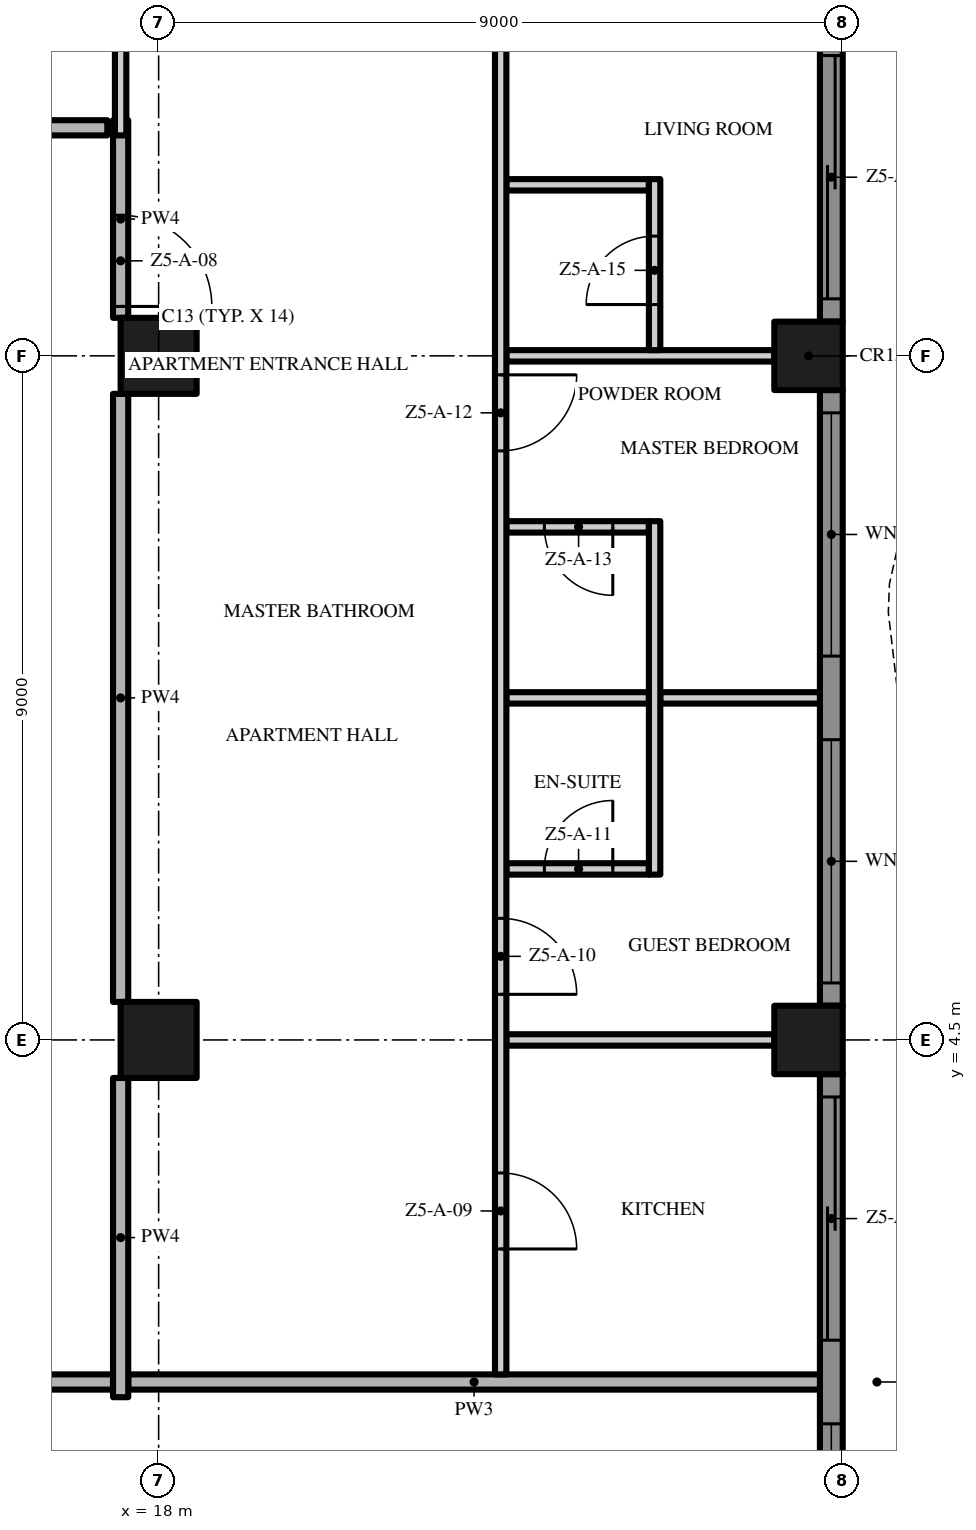
"""IFC4 building model, lengths in metres.
Left out: names, types, materials, properties, quantities, classifications, styles, units other than length and angle.
Written with IfcOpenShell. Run it as: python <this file> out.ifc"""

import sys

from ifc_helpers import new_model, si_unit, direction, frame, frame_2d, origin, origin_2d, place, context, subcontext, project, spatial, polyline, rectangle, outline, extrude, element, fill, save


model = new_model("IFC4")
c1 = context("Model", 3, precision=1e-05, world=origin(), true_north=direction((0.0, 1.0)))
c2 = subcontext(c1, "Body", "Model", "MODEL_VIEW")
j1 = project(units=[si_unit("LENGTHUNIT", "METRE"), si_unit("PLANEANGLEUNIT", "RADIAN")], contexts=[c1])
p1 = place(None, origin())
s1 = spatial("IfcSite", under=j1, at=p1, CompositionType="ELEMENT")
p2 = place(p1, origin())
s2 = spatial("IfcBuilding", under=s1, at=p2, CompositionType="ELEMENT")
p3 = place(p2, frame((0.0, 0.0, 238.8)))
s3 = spatial("IfcBuildingStorey", under=s2, at=p3, CompositionType="ELEMENT", Elevation=238.8)
for number, where, z_axis, x_axis in (
    (1, (18.0, 13.5, 0.0), (0.0, 0.0, 1.0), (1.0, 0.0, 0.0)),
    (2, (18.0, 4.5, 0.0), (0.0, 0.0, 1.0), (1.0, 0.0, 0.0)),
):
    element("IfcColumn", number, at=place(p3, frame(where, z_axis=z_axis, x_axis=x_axis)), inside=s3, PredefinedType="COLUMN", context=c2, shape_type="SweptSolid", body=[
        extrude(rectangle(XDim=1.0, YDim=1.0, at=origin_2d()), origin(), (0.0, 0.0, 1.0), 3.5),
    ])
for number, where, z_axis, x_axis in (
    (3, (26.55, 13.5, 0.0), (0.0, 0.0, 1.0), (1.0, 0.0, 0.0)),
    (4, (26.55, 4.5, 0.0), (0.0, 0.0, 1.0), (1.0, 0.0, 0.0)),
):
    element("IfcColumn", number, at=place(p3, frame(where, z_axis=z_axis, x_axis=x_axis)), inside=s3, PredefinedType="COLUMN", context=c2, shape_type="SweptSolid", body=[
        extrude(rectangle(XDim=0.9, YDim=0.9, at=origin_2d()), origin(), (0.0, 0.0, 1.0), 3.5),
    ])
p4 = place(p3, frame((26.85, 4.05, 0.0), z_axis=(0.0, 0.0, 1.0), x_axis=(0.0, -1.0, 0.0)))
e5 = element("IfcWall", 5, at=p4, inside=s3, PredefinedType="SOLIDWALL", context=c2, shape_type="SweptSolid", body=[
    extrude(rectangle(XDim=8.1, YDim=0.3, at=frame_2d((4.05, 0.0))), origin(), (0.0, 0.0, 1.0), 3.5),
])
p5 = place(p4, frame((4.6, 0.0, 0.45)))
e6 = element("IfcOpeningElement", 6, at=p5, cuts=e5, PredefinedType="OPENING", context=c2, shape_type="SweptSolid", body=[
    extrude(rectangle(XDim=3.2, YDim=2.65, at=frame_2d((1.6, 1.325))), frame((0.0, 0.16, 0.0), z_axis=(0.0, -1.0, 0.0), x_axis=(1.0, 0.0, 0.0)), (0.0, 0.0, 1.0), 0.32),
])
p6 = place(p4, frame((0.3, 0.0, 0.0)))
e7 = element("IfcOpeningElement", 7, at=p6, cuts=e5, PredefinedType="OPENING", context=c2, shape_type="SweptSolid", body=[
    extrude(rectangle(XDim=3.2, YDim=2.4, at=frame_2d((1.6, 1.2))), frame((0.0, 0.16, 0.0), z_axis=(0.0, -1.0, 0.0), x_axis=(1.0, 0.0, 0.0)), (0.0, 0.0, 1.0), 0.32),
])
p7 = place(p3, frame((26.85, 13.05, 0.0), z_axis=(0.0, 0.0, 1.0), x_axis=(0.0, -1.0, 0.0)))
e8 = element("IfcWall", 8, at=p7, inside=s3, PredefinedType="SOLIDWALL", context=c2, shape_type="SweptSolid", body=[
    extrude(rectangle(XDim=8.1, YDim=0.3, at=frame_2d((4.05, 0.0))), origin(), (0.0, 0.0, 1.0), 3.5),
])
p8 = place(p7, frame((4.6, 0.0, 0.45)))
e9 = element("IfcOpeningElement", 9, at=p8, cuts=e8, PredefinedType="OPENING", context=c2, shape_type="SweptSolid", body=[
    extrude(rectangle(XDim=3.2, YDim=2.65, at=frame_2d((1.6, 1.325))), frame((0.0, 0.16, 0.0), z_axis=(0.0, -1.0, 0.0), x_axis=(1.0, 0.0, 0.0)), (0.0, 0.0, 1.0), 0.32),
])
p9 = place(p7, frame((0.3, 0.0, 0.45)))
e10 = element("IfcOpeningElement", 10, at=p9, cuts=e8, PredefinedType="OPENING", context=c2, shape_type="SweptSolid", body=[
    extrude(rectangle(XDim=3.2, YDim=2.65, at=frame_2d((1.6, 1.325))), frame((0.0, 0.16, 0.0), z_axis=(0.0, -1.0, 0.0), x_axis=(1.0, 0.0, 0.0)), (0.0, 0.0, 1.0), 0.32),
])
p10 = place(p3, frame((26.85, 18.0, 0.0), z_axis=(0.0, 0.0, 1.0), x_axis=(0.0, -1.0, 0.0)))
e11 = element("IfcWall", 11, at=p10, inside=s3, PredefinedType="SOLIDWALL", context=c2, shape_type="SweptSolid", body=[
    extrude(rectangle(XDim=4.05, YDim=0.3, at=frame_2d((2.025, 0.0))), origin(), (0.0, 0.0, 1.0), 3.5),
])
p11 = place(p10, frame((0.55, 0.0, 0.0)))
e12 = element("IfcOpeningElement", 12, at=p11, cuts=e11, PredefinedType="OPENING", context=c2, shape_type="SweptSolid", body=[
    extrude(rectangle(XDim=3.2, YDim=2.4, at=frame_2d((1.6, 1.2))), frame((0.0, 0.16, 0.0), z_axis=(0.0, -1.0, 0.0), x_axis=(1.0, 0.0, 0.0)), (0.0, 0.0, 1.0), 0.32),
])
p12 = place(p3, origin())
e13 = element("IfcWall", 13, at=p12, inside=s3, PredefinedType="USERDEFINED", context=c2, shape_type="SweptSolid", body=[
    extrude(outline(polyline([(27.951, -18.0), (28.612, -16.5), (29.345, -15.0), (29.869, -13.5), (30.0, -12.375), (29.985, -12.0), (29.649, -10.5), (28.988, -9.0), (28.255, -7.5), (27.731, -6.0), (27.6, -4.875), (27.615, -4.5), (27.951, -3.0), (28.612, -1.5), (29.345, 0.0), (29.869, 1.5), (30.0, 2.625), (29.985, 3.0), (29.649, 4.5), (28.988, 6.0), (28.255, 7.5), (27.731, 9.0), (27.6, 10.125), (27.615, 10.5), (27.951, 12.0), (28.612, 13.5), (29.345, 15.0), (29.869, 16.5), (30.0, 17.625), (29.985, 18.0), (29.735, 17.99), (29.749, 17.635), (29.624, 16.556), (29.114, 15.096), (28.385, 13.605), (27.713, 12.079), (27.366, 10.533), (27.349, 10.115), (27.486, 8.944), (28.024, 7.404), (28.761, 5.895), (29.41, 4.421), (29.736, 2.967), (29.749, 2.635), (29.624, 1.556), (29.114, 0.096), (28.385, -1.395), (27.713, -2.921), (27.366, -4.467), (27.349, -4.885), (27.486, -6.056), (28.024, -7.596), (28.761, -9.105), (29.41, -10.579), (29.736, -12.033), (29.749, -12.365), (29.624, -13.444), (29.114, -14.904), (28.385, -16.395), (27.723, -17.899), (27.951, -18.0)])), origin(), (0.0, 0.0, 1.0), 0.9),
])
p13 = place(p3, frame((17.4, 0.0, 0.0), z_axis=(0.0, 0.0, 1.0), x_axis=(-1.0, 0.0, 0.0)))
e14 = element("IfcWall", 14, at=p13, inside=s3, PredefinedType="PARTITIONING", context=c2, shape_type="SweptSolid", body=[
    extrude(rectangle(XDim=34.8, YDim=0.2, at=frame_2d((17.4, 0.0))), origin(), (0.0, 0.0, 1.0), 3.5),
])
p14 = place(p13, frame((25.65, 0.0, 0.0)))
e15 = element("IfcOpeningElement", 15, at=p14, cuts=e14, PredefinedType="OPENING", context=c2, shape_type="SweptSolid", body=[
    extrude(rectangle(XDim=1.5, YDim=2.4, at=frame_2d((0.75, 1.2))), frame((0.0, 0.11, 0.0), z_axis=(0.0, -1.0, 0.0), x_axis=(1.0, 0.0, 0.0)), (0.0, 0.0, 1.0), 0.22),
])
p15 = place(p13, frame((7.65, 0.0, 0.0)))
e16 = element("IfcOpeningElement", 16, at=p15, cuts=e14, PredefinedType="OPENING", context=c2, shape_type="SweptSolid", body=[
    extrude(rectangle(XDim=1.5, YDim=2.4, at=frame_2d((0.75, 1.2))), frame((0.0, 0.11, 0.0), z_axis=(0.0, -1.0, 0.0), x_axis=(1.0, 0.0, 0.0)), (0.0, 0.0, 1.0), 0.22),
])
p16 = place(p3, frame((17.6, 0.0, 0.0), z_axis=(0.0, 0.0, 1.0), x_axis=(1.0, 0.0, 0.0)))
e17 = element("IfcWall", 17, at=p16, inside=s3, PredefinedType="PARTITIONING", context=c2, shape_type="SweptSolid", body=[
    extrude(rectangle(XDim=9.1, YDim=0.2, at=frame_2d((4.55, 0.0))), origin(), (0.0, 0.0, 1.0), 3.5),
])
p17 = place(p3, frame((22.575, 4.5, 0.0), z_axis=(0.0, 0.0, 1.0), x_axis=(1.0, 0.0, 0.0)))
e18 = element("IfcWall", 18, at=p17, inside=s3, PredefinedType="PARTITIONING", context=c2, shape_type="SweptSolid", body=[
    extrude(rectangle(XDim=3.525, YDim=0.15, at=frame_2d((1.762, 0.0))), origin(), (0.0, 0.0, 1.0), 3.5),
])
p18 = place(p3, frame((22.575, 6.75, 0.0), z_axis=(0.0, 0.0, 1.0), x_axis=(1.0, 0.0, 0.0)))
e19 = element("IfcWall", 19, at=p18, inside=s3, PredefinedType="PARTITIONING", context=c2, shape_type="SweptSolid", body=[
    extrude(rectangle(XDim=1.875, YDim=0.15, at=frame_2d((0.938, 0.0))), origin(), (0.0, 0.0, 1.0), 3.5),
])
p19 = place(p18, frame((0.5, 0.0, 0.0)))
e20 = element("IfcOpeningElement", 20, at=p19, cuts=e19, PredefinedType="OPENING", context=c2, shape_type="SweptSolid", body=[
    extrude(rectangle(XDim=0.9, YDim=2.1, at=frame_2d((0.45, 1.05))), frame((0.0, 0.085, 0.0), z_axis=(0.0, -1.0, 0.0), x_axis=(1.0, 0.0, 0.0)), (0.0, 0.0, 1.0), 0.17),
])
p20 = place(p3, frame((22.575, 9.0, 0.0), z_axis=(0.0, 0.0, 1.0), x_axis=(1.0, 0.0, 0.0)))
e21 = element("IfcWall", 21, at=p20, inside=s3, PredefinedType="PARTITIONING", context=c2, shape_type="SweptSolid", body=[
    extrude(rectangle(XDim=1.875, YDim=0.15, at=frame_2d((0.938, 0.0))), origin(), (0.0, 0.0, 1.0), 3.5),
])
p21 = place(p3, frame((24.6, 9.0, 0.0), z_axis=(0.0, 0.0, 1.0), x_axis=(1.0, 0.0, 0.0)))
e22 = element("IfcWall", 22, at=p21, inside=s3, PredefinedType="PARTITIONING", context=c2, shape_type="SweptSolid", body=[
    extrude(rectangle(XDim=2.1, YDim=0.15, at=frame_2d((1.05, 0.0))), origin(), (0.0, 0.0, 1.0), 3.5),
])
p22 = place(p3, frame((24.45, 11.25, 0.0), z_axis=(0.0, 0.0, 1.0), x_axis=(-1.0, 0.0, 0.0)))
e23 = element("IfcWall", 23, at=p22, inside=s3, PredefinedType="PARTITIONING", context=c2, shape_type="SweptSolid", body=[
    extrude(rectangle(XDim=1.875, YDim=0.15, at=frame_2d((0.938, 0.0))), origin(), (0.0, 0.0, 1.0), 3.5),
])
p23 = place(p22, frame((0.475, 0.0, 0.0)))
e24 = element("IfcOpeningElement", 24, at=p23, cuts=e23, PredefinedType="OPENING", context=c2, shape_type="SweptSolid", body=[
    extrude(rectangle(XDim=0.9, YDim=2.1, at=frame_2d((0.45, 1.05))), frame((0.0, 0.085, 0.0), z_axis=(0.0, -1.0, 0.0), x_axis=(1.0, 0.0, 0.0)), (0.0, 0.0, 1.0), 0.17),
])
p24 = place(p3, frame((22.575, 13.5, 0.0), z_axis=(0.0, 0.0, 1.0), x_axis=(1.0, 0.0, 0.0)))
e25 = element("IfcWall", 25, at=p24, inside=s3, PredefinedType="PARTITIONING", context=c2, shape_type="SweptSolid", body=[
    extrude(rectangle(XDim=3.525, YDim=0.15, at=frame_2d((1.762, 0.0))), origin(), (0.0, 0.0, 1.0), 3.5),
])
p25 = place(p3, frame((22.575, 15.75, 0.0), z_axis=(0.0, 0.0, 1.0), x_axis=(1.0, 0.0, 0.0)))
e26 = element("IfcWall", 26, at=p25, inside=s3, PredefinedType="PARTITIONING", context=c2, shape_type="SweptSolid", body=[
    extrude(rectangle(XDim=1.875, YDim=0.15, at=frame_2d((0.938, 0.0))), origin(), (0.0, 0.0, 1.0), 3.5),
])
p26 = place(p3, frame((13.5, 16.5, 0.0), z_axis=(0.0, 0.0, 1.0), x_axis=(1.0, 0.0, 0.0)))
e27 = element("IfcWall", 27, at=p26, inside=s3, PredefinedType="PARTITIONING", context=c2, shape_type="SweptSolid", body=[
    extrude(rectangle(XDim=3.825, YDim=0.2, at=frame_2d((1.913, 0.0))), origin(), (0.0, 0.0, 1.0), 3.5),
])
p27 = place(p26, frame((1.55, 0.0, 0.0)))
e28 = element("IfcOpeningElement", 28, at=p27, cuts=e27, PredefinedType="OPENING", context=c2, shape_type="SweptSolid", body=[
    extrude(rectangle(XDim=0.9, YDim=2.1, at=frame_2d((0.45, 1.05))), frame((0.0, 0.11, 0.0), z_axis=(0.0, -1.0, 0.0), x_axis=(1.0, 0.0, 0.0)), (0.0, 0.0, 1.0), 0.22),
])
p28 = place(p3, frame((17.5, -0.2, 0.0), z_axis=(0.0, 0.0, 1.0), x_axis=(0.0, 1.0, 0.0)))
e29 = element("IfcWall", 29, at=p28, inside=s3, PredefinedType="PARTITIONING", context=c2, shape_type="SweptSolid", body=[
    extrude(rectangle(XDim=4.2, YDim=0.2, at=frame_2d((2.1, 0.0))), origin(), (0.0, 0.0, 1.0), 3.5),
])
p29 = place(p3, frame((17.5, 5.0, 0.0), z_axis=(0.0, 0.0, 1.0), x_axis=(0.0, 1.0, 0.0)))
e30 = element("IfcWall", 30, at=p29, inside=s3, PredefinedType="PARTITIONING", context=c2, shape_type="SweptSolid", body=[
    extrude(rectangle(XDim=8.0, YDim=0.2, at=frame_2d((4.0, 0.0))), origin(), (0.0, 0.0, 1.0), 3.5),
])
p30 = place(p3, frame((17.5, 16.6, 0.0), z_axis=(0.0, 0.0, 1.0), x_axis=(0.0, -1.0, 0.0)))
e31 = element("IfcWall", 31, at=p30, inside=s3, PredefinedType="PARTITIONING", context=c2, shape_type="SweptSolid", body=[
    extrude(rectangle(XDim=2.6, YDim=0.2, at=frame_2d((1.3, 0.0))), origin(), (0.0, 0.0, 1.0), 3.5),
])
p31 = place(p30, frame((1.25, 0.0, 0.0)))
e32 = element("IfcOpeningElement", 32, at=p31, cuts=e31, PredefinedType="OPENING", context=c2, shape_type="SweptSolid", body=[
    extrude(rectangle(XDim=1.2, YDim=2.4, at=frame_2d((0.6, 1.2))), frame((0.0, 0.11, 0.0), z_axis=(0.0, -1.0, 0.0), x_axis=(1.0, 0.0, 0.0)), (0.0, 0.0, 1.0), 0.22),
])
p32 = place(p3, frame((17.5, 16.4, 0.0), z_axis=(0.0, 0.0, 1.0), x_axis=(0.0, 1.0, 0.0)))
e33 = element("IfcWall", 33, at=p32, inside=s3, PredefinedType="PARTITIONING", context=c2, shape_type="SweptSolid", body=[
    extrude(rectangle(XDim=5.2, YDim=0.15, at=frame_2d((2.6, 0.0))), origin(), (0.0, 0.0, 1.0), 3.5),
])
p33 = place(p3, frame((22.5, 17.55, 0.0), z_axis=(0.0, 0.0, 1.0), x_axis=(0.0, -1.0, 0.0)))
e34 = element("IfcWall", 34, at=p33, inside=s3, PredefinedType="PARTITIONING", context=c2, shape_type="SweptSolid", body=[
    extrude(rectangle(XDim=17.45, YDim=0.15, at=frame_2d((8.725, 0.0))), origin(), (0.0, 0.0, 1.0), 3.5),
])
p34 = place(p33, frame((14.8, 0.0, 0.0)))
e35 = element("IfcOpeningElement", 35, at=p34, cuts=e34, PredefinedType="OPENING", context=c2, shape_type="SweptSolid", body=[
    extrude(rectangle(XDim=1.0, YDim=2.4, at=frame_2d((0.5, 1.2))), frame((0.0, 0.085, 0.0), z_axis=(0.0, -1.0, 0.0), x_axis=(1.0, 0.0, 0.0)), (0.0, 0.0, 1.0), 0.17),
])
p35 = place(p33, frame((11.45, 0.0, 0.0)))
e36 = element("IfcOpeningElement", 36, at=p35, cuts=e34, PredefinedType="OPENING", context=c2, shape_type="SweptSolid", body=[
    extrude(rectangle(XDim=1.0, YDim=2.4, at=frame_2d((0.5, 1.2))), frame((0.0, 0.085, 0.0), z_axis=(0.0, -1.0, 0.0), x_axis=(1.0, 0.0, 0.0)), (0.0, 0.0, 1.0), 0.17),
])
p36 = place(p33, frame((4.3, 0.0, 0.0)))
e37 = element("IfcOpeningElement", 37, at=p36, cuts=e34, PredefinedType="OPENING", context=c2, shape_type="SweptSolid", body=[
    extrude(rectangle(XDim=1.0, YDim=2.4, at=frame_2d((0.5, 1.2))), frame((0.0, 0.085, 0.0), z_axis=(0.0, -1.0, 0.0), x_axis=(1.0, 0.0, 0.0)), (0.0, 0.0, 1.0), 0.17),
])
p37 = place(p3, frame((24.525, 6.675, 0.0), z_axis=(0.0, 0.0, 1.0), x_axis=(0.0, 1.0, 0.0)))
e38 = element("IfcWall", 38, at=p37, inside=s3, PredefinedType="PARTITIONING", context=c2, shape_type="SweptSolid", body=[
    extrude(rectangle(XDim=4.65, YDim=0.15, at=frame_2d((2.325, 0.0))), origin(), (0.0, 0.0, 1.0), 3.5),
])
p38 = place(p3, frame((24.525, 13.575, 0.0), z_axis=(0.0, 0.0, 1.0), x_axis=(0.0, 1.0, 0.0)))
e39 = element("IfcWall", 39, at=p38, inside=s3, PredefinedType="PARTITIONING", context=c2, shape_type="SweptSolid", body=[
    extrude(rectangle(XDim=2.25, YDim=0.15, at=frame_2d((1.125, 0.0))), origin(), (0.0, 0.0, 1.0), 3.5),
])
p39 = place(p38, frame((0.6, 0.0, 0.0)))
e40 = element("IfcOpeningElement", 40, at=p39, cuts=e39, PredefinedType="OPENING", context=c2, shape_type="SweptSolid", body=[
    extrude(rectangle(XDim=0.9, YDim=2.1, at=frame_2d((0.45, 1.05))), frame((0.0, 0.085, 0.0), z_axis=(0.0, -1.0, 0.0), x_axis=(1.0, 0.0, 0.0)), (0.0, 0.0, 1.0), 0.17),
])
p40 = place(p5, origin())
e41 = element("IfcWindow", 41, at=p40, inside=s3, PartitioningType="SINGLE_PANEL", PredefinedType="WINDOW", context=c2, shape_type="SweptSolid", body=[
    extrude(rectangle(XDim=3.2, YDim=2.65, at=frame_2d((1.6, 1.325))), frame((0.0, 0.03, 0.0), z_axis=(0.0, -1.0, 0.0), x_axis=(1.0, 0.0, 0.0)), (0.0, 0.0, 1.0), 0.06),
])
fill(e6, e41)
p41 = place(p6, origin())
e42 = element("IfcDoor", 42, at=p41, inside=s3, OperationType="SINGLE_SWING_LEFT", PredefinedType="DOOR", context=c2, shape_type="SweptSolid", body=[
    extrude(rectangle(XDim=3.2, YDim=2.4, at=frame_2d((1.6, 1.2))), frame((0.0, 0.025, 0.0), z_axis=(0.0, -1.0, 0.0), x_axis=(1.0, 0.0, 0.0)), (0.0, 0.0, 1.0), 0.05),
])
fill(e7, e42)
p42 = place(p8, origin())
e43 = element("IfcWindow", 43, at=p42, inside=s3, PartitioningType="SINGLE_PANEL", PredefinedType="WINDOW", context=c2, shape_type="SweptSolid", body=[
    extrude(rectangle(XDim=3.2, YDim=2.65, at=frame_2d((1.6, 1.325))), frame((0.0, 0.03, 0.0), z_axis=(0.0, -1.0, 0.0), x_axis=(1.0, 0.0, 0.0)), (0.0, 0.0, 1.0), 0.06),
])
fill(e9, e43)
p43 = place(p9, origin())
e44 = element("IfcWindow", 44, at=p43, inside=s3, PartitioningType="SINGLE_PANEL", PredefinedType="WINDOW", context=c2, shape_type="SweptSolid", body=[
    extrude(rectangle(XDim=3.2, YDim=2.65, at=frame_2d((1.6, 1.325))), frame((0.0, 0.03, 0.0), z_axis=(0.0, -1.0, 0.0), x_axis=(1.0, 0.0, 0.0)), (0.0, 0.0, 1.0), 0.06),
])
fill(e10, e44)
p44 = place(p11, origin())
e45 = element("IfcDoor", 45, at=p44, inside=s3, OperationType="SINGLE_SWING_LEFT", PredefinedType="DOOR", context=c2, shape_type="SweptSolid", body=[
    extrude(rectangle(XDim=3.2, YDim=2.4, at=frame_2d((1.6, 1.2))), frame((0.0, 0.025, 0.0), z_axis=(0.0, -1.0, 0.0), x_axis=(1.0, 0.0, 0.0)), (0.0, 0.0, 1.0), 0.05),
])
fill(e12, e45)
p45 = place(p31, origin())
e46 = element("IfcDoor", 46, at=p45, inside=s3, OperationType="SINGLE_SWING_RIGHT", PredefinedType="DOOR", context=c2, shape_type="SweptSolid", body=[
    extrude(rectangle(XDim=1.2, YDim=2.4, at=frame_2d((0.6, 1.2))), frame((0.0, 0.025, 0.0), z_axis=(0.0, -1.0, 0.0), x_axis=(1.0, 0.0, 0.0)), (0.0, 0.0, 1.0), 0.05),
])
fill(e32, e46)
p46 = place(p34, origin())
e47 = element("IfcDoor", 47, at=p46, inside=s3, OperationType="SINGLE_SWING_RIGHT", PredefinedType="DOOR", context=c2, shape_type="SweptSolid", body=[
    extrude(rectangle(XDim=1.0, YDim=2.4, at=frame_2d((0.5, 1.2))), frame((0.0, 0.025, 0.0), z_axis=(0.0, -1.0, 0.0), x_axis=(1.0, 0.0, 0.0)), (0.0, 0.0, 1.0), 0.05),
])
fill(e35, e47)
p47 = place(p35, origin())
e48 = element("IfcDoor", 48, at=p47, inside=s3, OperationType="SINGLE_SWING_RIGHT", PredefinedType="DOOR", context=c2, shape_type="SweptSolid", body=[
    extrude(rectangle(XDim=1.0, YDim=2.4, at=frame_2d((0.5, 1.2))), frame((0.0, 0.025, 0.0), z_axis=(0.0, -1.0, 0.0), x_axis=(1.0, 0.0, 0.0)), (0.0, 0.0, 1.0), 0.05),
])
fill(e36, e48)
p48 = place(p19, origin())
e49 = element("IfcDoor", 49, at=p48, inside=s3, OperationType="SINGLE_SWING_RIGHT", PredefinedType="DOOR", context=c2, shape_type="SweptSolid", body=[
    extrude(rectangle(XDim=0.9, YDim=2.1, at=frame_2d((0.45, 1.05))), frame((0.0, 0.025, 0.0), z_axis=(0.0, -1.0, 0.0), x_axis=(1.0, 0.0, 0.0)), (0.0, 0.0, 1.0), 0.05),
])
fill(e20, e49)
p49 = place(p36, origin())
e50 = element("IfcDoor", 50, at=p49, inside=s3, OperationType="SINGLE_SWING_LEFT", PredefinedType="DOOR", context=c2, shape_type="SweptSolid", body=[
    extrude(rectangle(XDim=1.0, YDim=2.4, at=frame_2d((0.5, 1.2))), frame((0.0, 0.025, 0.0), z_axis=(0.0, -1.0, 0.0), x_axis=(1.0, 0.0, 0.0)), (0.0, 0.0, 1.0), 0.05),
])
fill(e37, e50)
p50 = place(p23, origin())
e51 = element("IfcDoor", 51, at=p50, inside=s3, OperationType="SINGLE_SWING_LEFT", PredefinedType="DOOR", context=c2, shape_type="SweptSolid", body=[
    extrude(rectangle(XDim=0.9, YDim=2.1, at=frame_2d((0.45, 1.05))), frame((0.0, 0.025, 0.0), z_axis=(0.0, -1.0, 0.0), x_axis=(1.0, 0.0, 0.0)), (0.0, 0.0, 1.0), 0.05),
])
fill(e24, e51)
p51 = place(p39, origin())
e52 = element("IfcDoor", 52, at=p51, inside=s3, OperationType="SINGLE_SWING_LEFT", PredefinedType="DOOR", context=c2, shape_type="SweptSolid", body=[
    extrude(rectangle(XDim=0.9, YDim=2.1, at=frame_2d((0.45, 1.05))), frame((0.0, 0.025, 0.0), z_axis=(0.0, -1.0, 0.0), x_axis=(1.0, 0.0, 0.0)), (0.0, 0.0, 1.0), 0.05),
])
fill(e40, e52)
save(model, sys.argv[1])
